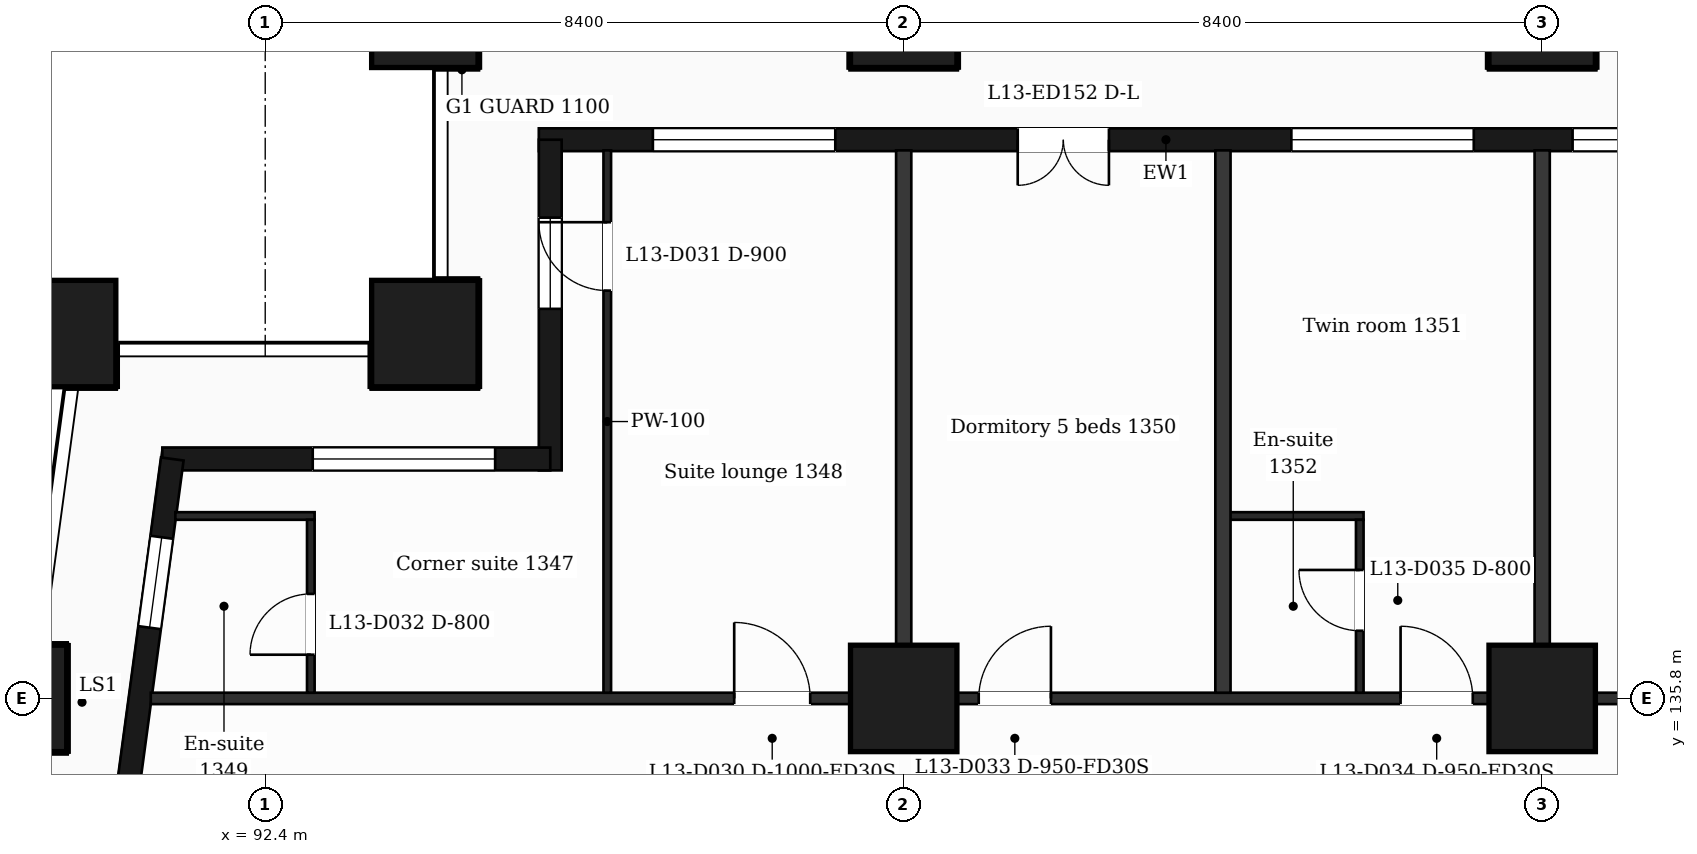
"""IFC4 building model, lengths in metres.
Left out: names, types, materials, properties, quantities, classifications, styles, units other than length and angle.
Written with IfcOpenShell. Run it as: python <this file> out.ifc"""

import sys

from ifc_helpers import new_model, si_unit, direction, frame, frame_2d, origin, origin_2d, place, context, subcontext, project, spatial, rectangle, extrude, element, fill, save


model = new_model("IFC4")
c1 = context("Model", 3, precision=1e-05, world=origin(), true_north=direction((0.0, 1.0)))
c2 = subcontext(c1, "Body", "Model", "MODEL_VIEW")
j1 = project(units=[si_unit("LENGTHUNIT", "METRE"), si_unit("PLANEANGLEUNIT", "RADIAN")], contexts=[c1])
p1 = place(None, origin())
s1 = spatial("IfcSite", under=j1, at=p1, CompositionType="ELEMENT")
p2 = place(p1, origin())
s2 = spatial("IfcBuilding", under=s1, at=p2, CompositionType="ELEMENT")
p3 = place(p2, frame((0.0, 0.0, 63.5)))
s3 = spatial("IfcBuildingStorey", under=s2, at=p3, CompositionType="ELEMENT", Elevation=63.5)
for number, where, z_axis, x_axis in (
    (1, (94.5, 140.6, 0.0), (0.0, 0.0, 1.0), (1.0, 0.0, 0.0)),
    (2, (89.735, 140.6, 0.0), (0.0, 0.0, 1.0), (1.0, 0.0, 0.0)),
    (3, (100.8, 135.8, 0.0), (0.0, 0.0, 1.0), (1.0, 0.0, 0.0)),
    (4, (109.2, 135.8, 0.0), (0.0, 0.0, 1.0), (1.0, 0.0, 0.0)),
    (5, (89.088, 135.8, 0.0), (0.0, 0.0, 1.0), (1.0, 0.0, 0.0)),
    (6, (100.8, 144.8, 0.0), (0.0, 0.0, 1.0), (1.0, 0.0, 0.0)),
    (7, (109.2, 144.8, 0.0), (0.0, 0.0, 1.0), (1.0, 0.0, 0.0)),
    (8, (94.5, 144.8, 0.0), (0.0, 0.0, 1.0), (1.0, 0.0, 0.0)),
):
    element("IfcColumn", number, at=place(p3, frame(where, z_axis=z_axis, x_axis=x_axis)), inside=s3, PredefinedType="COLUMN", context=c2, shape_type="SweptSolid", body=[
        extrude(rectangle(XDim=1.4, YDim=1.4, at=origin_2d()), origin(), (0.0, 0.0, 1.0), 3.5),
    ])
p4 = place(p3, frame((112.5, 143.15, 0.0), z_axis=(0.0, 0.0, 1.0), x_axis=(-1.0, 0.0, 0.0)))
e9 = element("IfcWall", 9, at=p4, inside=s3, PredefinedType="SOLIDWALL", context=c2, shape_type="SweptSolid", body=[
    extrude(rectangle(XDim=16.5, YDim=0.3, at=frame_2d((8.25, 0.0))), origin(), (0.0, 0.0, 1.0), 3.18),
])
p5 = place(p4, frame((0.5, 0.0, 0.9)))
e10 = element("IfcOpeningElement", 10, at=p5, cuts=e9, PredefinedType="OPENING", context=c2, shape_type="SweptSolid", body=[
    extrude(rectangle(XDim=2.4, YDim=2.1, at=frame_2d((1.2, 1.05))), frame((0.0, 0.16, 0.0), z_axis=(0.0, -1.0, 0.0), x_axis=(1.0, 0.0, 0.0)), (0.0, 0.0, 1.0), 0.32),
])
p6 = place(p4, frame((4.2, 0.0, 0.9)))
e11 = element("IfcOpeningElement", 11, at=p6, cuts=e9, PredefinedType="OPENING", context=c2, shape_type="SweptSolid", body=[
    extrude(rectangle(XDim=2.4, YDim=2.1, at=frame_2d((1.2, 1.05))), frame((0.0, 0.16, 0.0), z_axis=(0.0, -1.0, 0.0), x_axis=(1.0, 0.0, 0.0)), (0.0, 0.0, 1.0), 0.32),
])
p7 = place(p4, frame((9.0, 0.0, 0.0)))
e12 = element("IfcOpeningElement", 12, at=p7, cuts=e9, PredefinedType="OPENING", context=c2, shape_type="SweptSolid", body=[
    extrude(rectangle(XDim=1.2, YDim=2.4, at=frame_2d((0.6, 1.2))), frame((0.0, 0.16, 0.0), z_axis=(0.0, -1.0, 0.0), x_axis=(1.0, 0.0, 0.0)), (0.0, 0.0, 1.0), 0.32),
])
p8 = place(p4, frame((12.6, 0.0, 0.9)))
e13 = element("IfcOpeningElement", 13, at=p8, cuts=e9, PredefinedType="OPENING", context=c2, shape_type="SweptSolid", body=[
    extrude(rectangle(XDim=2.4, YDim=2.1, at=frame_2d((1.2, 1.05))), frame((0.0, 0.16, 0.0), z_axis=(0.0, -1.0, 0.0), x_axis=(1.0, 0.0, 0.0)), (0.0, 0.0, 1.0), 0.32),
])
p9 = place(p3, frame((96.15, 143.15, 0.0), z_axis=(0.0, 0.0, 1.0), x_axis=(0.0, -1.0, 0.0)))
e14 = element("IfcWall", 14, at=p9, inside=s3, PredefinedType="SOLIDWALL", context=c2, shape_type="SweptSolid", body=[
    extrude(rectangle(XDim=4.35, YDim=0.3, at=frame_2d((2.175, 0.0))), origin(), (0.0, 0.0, 1.0), 3.18),
])
p10 = place(p9, frame((1.025, 0.0, 0.9)))
e15 = element("IfcOpeningElement", 15, at=p10, cuts=e14, PredefinedType="OPENING", context=c2, shape_type="SweptSolid", body=[
    extrude(rectangle(XDim=1.2, YDim=2.1, at=frame_2d((0.6, 1.05))), frame((0.0, 0.16, 0.0), z_axis=(0.0, -1.0, 0.0), x_axis=(1.0, 0.0, 0.0)), (0.0, 0.0, 1.0), 0.32),
])
p11 = place(p3, frame((96.15, 138.95, 0.0), z_axis=(0.0, 0.0, 1.0), x_axis=(-1.0, 0.0, 0.0)))
e16 = element("IfcWall", 16, at=p11, inside=s3, PredefinedType="SOLIDWALL", context=c2, shape_type="SweptSolid", body=[
    extrude(rectangle(XDim=5.104, YDim=0.3, at=frame_2d((2.552, 0.0))), origin(), (0.0, 0.0, 1.0), 3.18),
])
p12 = place(p11, frame((0.725, 0.0, 0.9)))
e17 = element("IfcOpeningElement", 17, at=p12, cuts=e16, PredefinedType="OPENING", context=c2, shape_type="SweptSolid", body=[
    extrude(rectangle(XDim=2.4, YDim=2.1, at=frame_2d((1.2, 1.05))), frame((0.0, 0.16, 0.0), z_axis=(0.0, -1.0, 0.0), x_axis=(1.0, 0.0, 0.0)), (0.0, 0.0, 1.0), 0.32),
])
p13 = place(p3, frame((91.177, 138.95, 0.0), z_axis=(0.0, 0.0, 1.0), x_axis=(-0.133426664613, -0.991058689065, 0.0)))
e18 = element("IfcWall", 18, at=p13, inside=s3, PredefinedType="SOLIDWALL", context=c2, shape_type="SweptSolid", body=[
    extrude(rectangle(XDim=6.609, YDim=0.3, at=frame_2d((3.305, 0.0))), origin(), (0.0, 0.0, 1.0), 3.18),
])
p14 = place(p13, frame((1.039, 0.0, 0.9)))
e19 = element("IfcOpeningElement", 19, at=p14, cuts=e18, PredefinedType="OPENING", context=c2, shape_type="SweptSolid", body=[
    extrude(rectangle(XDim=1.2, YDim=2.1, at=frame_2d((0.6, 1.05))), frame((0.0, 0.16, 0.0), z_axis=(0.0, -1.0, 0.0), x_axis=(1.0, 0.0, 0.0)), (0.0, 0.0, 1.0), 0.32),
])
p15 = place(p13, frame((4.294, 0.0, 0.0)))
e20 = element("IfcOpeningElement", 20, at=p15, cuts=e18, PredefinedType="OPENING", context=c2, shape_type="SweptSolid", body=[
    extrude(rectangle(XDim=1.2, YDim=2.4, at=frame_2d((0.6, 1.2))), frame((0.0, 0.16, 0.0), z_axis=(0.0, -1.0, 0.0), x_axis=(1.0, 0.0, 0.0)), (0.0, 0.0, 1.0), 0.32),
])
p16 = place(p3, frame((90.895, 135.8, 0.0), z_axis=(0.0, 0.0, 1.0), x_axis=(1.0, 0.0, 0.0)))
e21 = element("IfcWall", 21, at=p16, inside=s3, PredefinedType="PARTITIONING", context=c2, shape_type="SweptSolid", body=[
    extrude(rectangle(XDim=45.011, YDim=0.15, at=frame_2d((22.505, 0.0))), origin(), (0.0, 0.0, 1.0), 3.18),
])
p17 = place(p16, frame((7.675, 0.0, 0.0)))
e22 = element("IfcOpeningElement", 22, at=p17, cuts=e21, PredefinedType="OPENING", context=c2, shape_type="SweptSolid", body=[
    extrude(rectangle(XDim=1.0, YDim=2.1, at=frame_2d((0.5, 1.05))), frame((0.0, 0.085, 0.0), z_axis=(0.0, -1.0, 0.0), x_axis=(1.0, 0.0, 0.0)), (0.0, 0.0, 1.0), 0.17),
])
p18 = place(p16, frame((10.892, 0.0, 0.0)))
e23 = element("IfcOpeningElement", 23, at=p18, cuts=e21, PredefinedType="OPENING", context=c2, shape_type="SweptSolid", body=[
    extrude(rectangle(XDim=0.95, YDim=2.1, at=frame_2d((0.475, 1.05))), frame((0.0, 0.085, 0.0), z_axis=(0.0, -1.0, 0.0), x_axis=(1.0, 0.0, 0.0)), (0.0, 0.0, 1.0), 0.17),
])
p19 = place(p16, frame((16.442, 0.0, 0.0)))
e24 = element("IfcOpeningElement", 24, at=p19, cuts=e21, PredefinedType="OPENING", context=c2, shape_type="SweptSolid", body=[
    extrude(rectangle(XDim=0.95, YDim=2.1, at=frame_2d((0.475, 1.05))), frame((0.0, 0.085, 0.0), z_axis=(0.0, -1.0, 0.0), x_axis=(1.0, 0.0, 0.0)), (0.0, 0.0, 1.0), 0.17),
])
p20 = place(p16, frame((22.368, 0.0, 0.0)))
e25 = element("IfcOpeningElement", 25, at=p20, cuts=e21, PredefinedType="OPENING", context=c2, shape_type="SweptSolid", body=[
    extrude(rectangle(XDim=0.95, YDim=2.1, at=frame_2d((0.475, 1.05))), frame((0.0, 0.085, 0.0), z_axis=(0.0, -1.0, 0.0), x_axis=(1.0, 0.0, 0.0)), (0.0, 0.0, 1.0), 0.17),
])
p21 = place(p16, frame((31.825, 0.0, 0.0)))
e26 = element("IfcOpeningElement", 26, at=p21, cuts=e21, PredefinedType="OPENING", context=c2, shape_type="SweptSolid", body=[
    extrude(rectangle(XDim=0.95, YDim=2.1, at=frame_2d((0.475, 1.05))), frame((0.0, 0.085, 0.0), z_axis=(0.0, -1.0, 0.0), x_axis=(1.0, 0.0, 0.0)), (0.0, 0.0, 1.0), 0.17),
])
p22 = place(p16, frame((36.775, 0.0, 0.0)))
e27 = element("IfcOpeningElement", 27, at=p22, cuts=e21, PredefinedType="OPENING", context=c2, shape_type="SweptSolid", body=[
    extrude(rectangle(XDim=1.0, YDim=2.1, at=frame_2d((0.5, 1.05))), frame((0.0, 0.085, 0.0), z_axis=(0.0, -1.0, 0.0), x_axis=(1.0, 0.0, 0.0)), (0.0, 0.0, 1.0), 0.17),
])
p23 = place(p3, frame((91.218, 138.2, 0.0), z_axis=(0.0, 0.0, 1.0), x_axis=(1.0, 0.0, 0.0)))
e28 = element("IfcWall", 28, at=p23, inside=s3, PredefinedType="PARTITIONING", context=c2, shape_type="SweptSolid", body=[
    extrude(rectangle(XDim=1.832, YDim=0.1, at=frame_2d((0.916, 0.0))), origin(), (0.0, 0.0, 1.0), 3.18),
])
p24 = place(p3, frame((105.0, 138.2, 0.0), z_axis=(0.0, 0.0, 1.0), x_axis=(1.0, 0.0, 0.0)))
e29 = element("IfcWall", 29, at=p24, inside=s3, PredefinedType="PARTITIONING", context=c2, shape_type="SweptSolid", body=[
    extrude(rectangle(XDim=1.85, YDim=0.1, at=frame_2d((0.925, 0.0))), origin(), (0.0, 0.0, 1.0), 3.18),
])
p25 = place(p3, frame((93.0, 135.875, 0.0), z_axis=(0.0, 0.0, 1.0), x_axis=(0.0, 1.0, 0.0)))
e30 = element("IfcWall", 30, at=p25, inside=s3, PredefinedType="PARTITIONING", context=c2, shape_type="SweptSolid", body=[
    extrude(rectangle(XDim=2.275, YDim=0.1, at=frame_2d((1.137, 0.0))), origin(), (0.0, 0.0, 1.0), 3.18),
])
p26 = place(p25, frame((0.5, 0.0, 0.0)))
e31 = element("IfcOpeningElement", 31, at=p26, cuts=e30, PredefinedType="OPENING", context=c2, shape_type="SweptSolid", body=[
    extrude(rectangle(XDim=0.8, YDim=2.1, at=frame_2d((0.4, 1.05))), frame((0.0, 0.06, 0.0), z_axis=(0.0, -1.0, 0.0), x_axis=(1.0, 0.0, 0.0)), (0.0, 0.0, 1.0), 0.12),
])
p27 = place(p3, frame((96.9, 135.875, 0.0), z_axis=(0.0, 0.0, 1.0), x_axis=(0.0, 1.0, 0.0)))
e32 = element("IfcWall", 32, at=p27, inside=s3, PredefinedType="PARTITIONING", context=c2, shape_type="SweptSolid", body=[
    extrude(rectangle(XDim=7.135, YDim=0.1, at=frame_2d((3.567, 0.0))), origin(), (0.0, 0.0, 1.0), 3.18),
])
p28 = place(p27, frame((5.29, 0.0, 0.0)))
e33 = element("IfcOpeningElement", 33, at=p28, cuts=e32, PredefinedType="OPENING", context=c2, shape_type="SweptSolid", body=[
    extrude(rectangle(XDim=0.9, YDim=2.1, at=frame_2d((0.45, 1.05))), frame((0.0, 0.06, 0.0), z_axis=(0.0, -1.0, 0.0), x_axis=(1.0, 0.0, 0.0)), (0.0, 0.0, 1.0), 0.12),
])
for number, where, z_axis, x_axis in (
    (34, (100.8, 135.875, 0.0), (0.0, 0.0, 1.0), (0.0, 1.0, 0.0)),
    (35, (105.0, 135.875, 0.0), (0.0, 0.0, 1.0), (0.0, 1.0, 0.0)),
):
    element("IfcWall", number, at=place(p3, frame(where, z_axis=z_axis, x_axis=x_axis)), inside=s3, PredefinedType="PARTITIONING", context=c2, shape_type="SweptSolid", body=[
        extrude(rectangle(XDim=7.135, YDim=0.2, at=frame_2d((3.567, 0.0))), origin(), (0.0, 0.0, 1.0), 3.18),
    ])
p29 = place(p3, frame((106.8, 135.875, 0.0), z_axis=(0.0, 0.0, 1.0), x_axis=(0.0, 1.0, 0.0)))
e36 = element("IfcWall", 36, at=p29, inside=s3, PredefinedType="PARTITIONING", context=c2, shape_type="SweptSolid", body=[
    extrude(rectangle(XDim=2.275, YDim=0.1, at=frame_2d((1.137, 0.0))), origin(), (0.0, 0.0, 1.0), 3.18),
])
p30 = place(p29, frame((0.815, 0.0, 0.0)))
e37 = element("IfcOpeningElement", 37, at=p30, cuts=e36, PredefinedType="OPENING", context=c2, shape_type="SweptSolid", body=[
    extrude(rectangle(XDim=0.8, YDim=2.1, at=frame_2d((0.4, 1.05))), frame((0.0, 0.06, 0.0), z_axis=(0.0, -1.0, 0.0), x_axis=(1.0, 0.0, 0.0)), (0.0, 0.0, 1.0), 0.12),
])
p31 = place(p3, frame((109.2, 135.875, 0.0), z_axis=(0.0, 0.0, 1.0), x_axis=(0.0, 1.0, 0.0)))
e38 = element("IfcWall", 38, at=p31, inside=s3, PredefinedType="PARTITIONING", context=c2, shape_type="SweptSolid", body=[
    extrude(rectangle(XDim=7.135, YDim=0.2, at=frame_2d((3.567, 0.0))), origin(), (0.0, 0.0, 1.0), 3.18),
])
p32 = place(p5, origin())
e39 = element("IfcWindow", 39, at=p32, inside=s3, PartitioningType="SINGLE_PANEL", PredefinedType="WINDOW", context=c2, shape_type="SweptSolid", body=[
    extrude(rectangle(XDim=2.4, YDim=2.1, at=frame_2d((1.2, 1.05))), frame((0.0, 0.03, 0.0), z_axis=(0.0, -1.0, 0.0), x_axis=(1.0, 0.0, 0.0)), (0.0, 0.0, 1.0), 0.06),
])
fill(e10, e39)
p33 = place(p6, origin())
e40 = element("IfcWindow", 40, at=p33, inside=s3, PartitioningType="SINGLE_PANEL", PredefinedType="WINDOW", context=c2, shape_type="SweptSolid", body=[
    extrude(rectangle(XDim=2.4, YDim=2.1, at=frame_2d((1.2, 1.05))), frame((0.0, 0.03, 0.0), z_axis=(0.0, -1.0, 0.0), x_axis=(1.0, 0.0, 0.0)), (0.0, 0.0, 1.0), 0.06),
])
fill(e11, e40)
p34 = place(p7, origin())
e41 = element("IfcDoor", 41, at=p34, inside=s3, OperationType="DOUBLE_DOOR_SINGLE_SWING", PredefinedType="DOOR", context=c2, shape_type="SweptSolid", body=[
    extrude(rectangle(XDim=1.2, YDim=2.4, at=frame_2d((0.6, 1.2))), frame((0.0, 0.025, 0.0), z_axis=(0.0, -1.0, 0.0), x_axis=(1.0, 0.0, 0.0)), (0.0, 0.0, 1.0), 0.05),
])
fill(e12, e41)
p35 = place(p8, origin())
e42 = element("IfcWindow", 42, at=p35, inside=s3, PartitioningType="SINGLE_PANEL", PredefinedType="WINDOW", context=c2, shape_type="SweptSolid", body=[
    extrude(rectangle(XDim=2.4, YDim=2.1, at=frame_2d((1.2, 1.05))), frame((0.0, 0.03, 0.0), z_axis=(0.0, -1.0, 0.0), x_axis=(1.0, 0.0, 0.0)), (0.0, 0.0, 1.0), 0.06),
])
fill(e13, e42)
p36 = place(p10, origin())
e43 = element("IfcWindow", 43, at=p36, inside=s3, PartitioningType="SINGLE_PANEL", PredefinedType="WINDOW", context=c2, shape_type="SweptSolid", body=[
    extrude(rectangle(XDim=1.2, YDim=2.1, at=frame_2d((0.6, 1.05))), frame((0.0, 0.03, 0.0), z_axis=(0.0, -1.0, 0.0), x_axis=(1.0, 0.0, 0.0)), (0.0, 0.0, 1.0), 0.06),
])
fill(e15, e43)
p37 = place(p12, origin())
e44 = element("IfcWindow", 44, at=p37, inside=s3, PartitioningType="SINGLE_PANEL", PredefinedType="WINDOW", context=c2, shape_type="SweptSolid", body=[
    extrude(rectangle(XDim=2.4, YDim=2.1, at=frame_2d((1.2, 1.05))), frame((0.0, 0.03, 0.0), z_axis=(0.0, -1.0, 0.0), x_axis=(1.0, 0.0, 0.0)), (0.0, 0.0, 1.0), 0.06),
])
fill(e17, e44)
p38 = place(p14, origin())
e45 = element("IfcWindow", 45, at=p38, inside=s3, PartitioningType="SINGLE_PANEL", PredefinedType="WINDOW", context=c2, shape_type="SweptSolid", body=[
    extrude(rectangle(XDim=1.2, YDim=2.1, at=frame_2d((0.6, 1.05))), frame((0.0, 0.03, 0.0), z_axis=(0.0, -1.0, 0.0), x_axis=(1.0, 0.0, 0.0)), (0.0, 0.0, 1.0), 0.06),
])
fill(e19, e45)
p39 = place(p17, origin())
e46 = element("IfcDoor", 46, at=p39, inside=s3, OperationType="SINGLE_SWING_LEFT", PredefinedType="DOOR", context=c2, shape_type="SweptSolid", body=[
    extrude(rectangle(XDim=1.0, YDim=2.1, at=frame_2d((0.5, 1.05))), frame((0.0, 0.025, 0.0), z_axis=(0.0, -1.0, 0.0), x_axis=(1.0, 0.0, 0.0)), (0.0, 0.0, 1.0), 0.05),
])
fill(e22, e46)
p40 = place(p28, origin())
e47 = element("IfcDoor", 47, at=p40, inside=s3, OperationType="SINGLE_SWING_RIGHT", PredefinedType="DOOR", context=c2, shape_type="SweptSolid", body=[
    extrude(rectangle(XDim=0.9, YDim=2.1, at=frame_2d((0.45, 1.05))), frame((0.0, 0.025, 0.0), z_axis=(0.0, -1.0, 0.0), x_axis=(1.0, 0.0, 0.0)), (0.0, 0.0, 1.0), 0.05),
])
fill(e33, e47)
p41 = place(p26, origin())
e48 = element("IfcDoor", 48, at=p41, inside=s3, OperationType="SINGLE_SWING_LEFT", PredefinedType="DOOR", context=c2, shape_type="SweptSolid", body=[
    extrude(rectangle(XDim=0.8, YDim=2.1, at=frame_2d((0.4, 1.05))), frame((0.0, 0.025, 0.0), z_axis=(0.0, -1.0, 0.0), x_axis=(1.0, 0.0, 0.0)), (0.0, 0.0, 1.0), 0.05),
])
fill(e31, e48)
p42 = place(p18, origin())
e49 = element("IfcDoor", 49, at=p42, inside=s3, OperationType="SINGLE_SWING_RIGHT", PredefinedType="DOOR", context=c2, shape_type="SweptSolid", body=[
    extrude(rectangle(XDim=0.95, YDim=2.1, at=frame_2d((0.475, 1.05))), frame((0.0, 0.025, 0.0), z_axis=(0.0, -1.0, 0.0), x_axis=(1.0, 0.0, 0.0)), (0.0, 0.0, 1.0), 0.05),
])
fill(e23, e49)
p43 = place(p19, origin())
e50 = element("IfcDoor", 50, at=p43, inside=s3, OperationType="SINGLE_SWING_LEFT", PredefinedType="DOOR", context=c2, shape_type="SweptSolid", body=[
    extrude(rectangle(XDim=0.95, YDim=2.1, at=frame_2d((0.475, 1.05))), frame((0.0, 0.025, 0.0), z_axis=(0.0, -1.0, 0.0), x_axis=(1.0, 0.0, 0.0)), (0.0, 0.0, 1.0), 0.05),
])
fill(e24, e50)
p44 = place(p30, origin())
e51 = element("IfcDoor", 51, at=p44, inside=s3, OperationType="SINGLE_SWING_RIGHT", PredefinedType="DOOR", context=c2, shape_type="SweptSolid", body=[
    extrude(rectangle(XDim=0.8, YDim=2.1, at=frame_2d((0.4, 1.05))), frame((0.0, 0.025, 0.0), z_axis=(0.0, -1.0, 0.0), x_axis=(1.0, 0.0, 0.0)), (0.0, 0.0, 1.0), 0.05),
])
fill(e37, e51)
save(model, sys.argv[1])
